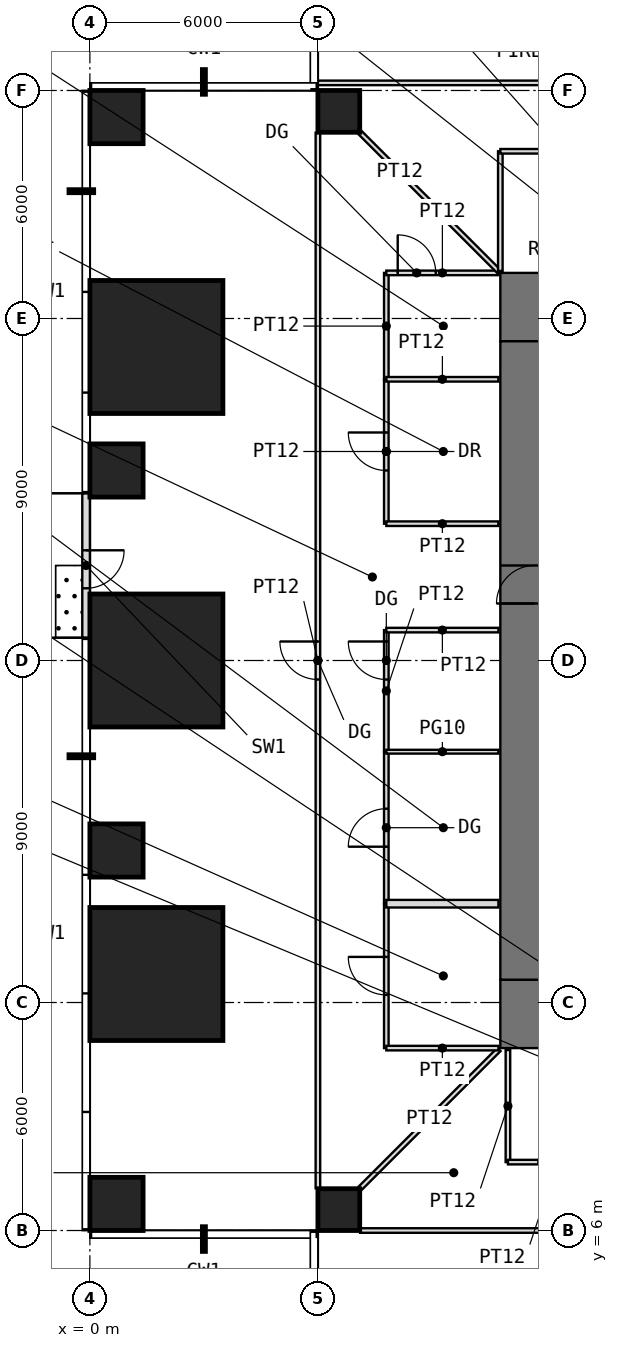
"""IFC4 building model, lengths in metres.
Left out: names, types, materials, properties, quantities, classifications, styles, units other than length and angle.
Written with IfcOpenShell. Run it as: python <this file> out.ifc"""

import sys

from ifc_helpers import new_model, si_unit, direction, frame, frame_2d, origin, origin_2d, place, context, subcontext, project, spatial, rectangle, extrude, element, fill, save


model = new_model("IFC4")
c1 = context("Model", 3, precision=1e-05, world=origin(), true_north=direction((0.0, 1.0)))
c2 = subcontext(c1, "Body", "Model", "MODEL_VIEW")
j1 = project(units=[si_unit("LENGTHUNIT", "METRE"), si_unit("PLANEANGLEUNIT", "RADIAN")], contexts=[c1])
p1 = place(None, origin())
s1 = spatial("IfcSite", under=j1, at=p1, CompositionType="ELEMENT")
p2 = place(p1, origin())
s2 = spatial("IfcBuilding", under=s1, at=p2, CompositionType="ELEMENT")
p3 = place(p2, frame((0.0, 0.0, 66.5)))
s3 = spatial("IfcBuildingStorey", under=s2, at=p3, CompositionType="ELEMENT", Elevation=66.5)
p4 = place(p3, frame((0.7, 6.7, 0.0), z_axis=(0.0, 0.0, 1.0), x_axis=(1.0, 0.0, 0.0)))
e1 = element("IfcColumn", 1, at=p4, inside=s3, PredefinedType="COLUMN", context=c2, shape_type="SweptSolid", body=[
    extrude(rectangle(XDim=1.4, YDim=1.4, at=origin_2d()), origin(), (0.0, 0.0, 1.0), 4.0),
])
p5 = place(p3, frame((6.55, 6.55, 0.0), z_axis=(0.0, 0.0, 1.0), x_axis=(1.0, 0.0, 0.0)))
e2 = element("IfcColumn", 2, at=p5, inside=s3, PredefinedType="COLUMN", context=c2, shape_type="SweptSolid", body=[
    extrude(rectangle(XDim=1.1, YDim=1.1, at=origin_2d()), origin(), (0.0, 0.0, 1.0), 4.0),
])
p6 = place(p3, frame((1.75, 12.75, 0.0), z_axis=(0.0, 0.0, 1.0), x_axis=(1.0, 0.0, 0.0)))
e3 = element("IfcColumn", 3, at=p6, inside=s3, PredefinedType="COLUMN", context=c2, shape_type="SweptSolid", body=[
    extrude(rectangle(XDim=3.5, YDim=3.5, at=origin_2d()), origin(), (0.0, 0.0, 1.0), 4.0),
])
p7 = place(p3, frame((0.7, 16.0, 0.0), z_axis=(0.0, 0.0, 1.0), x_axis=(1.0, 0.0, 0.0)))
e4 = element("IfcColumn", 4, at=p7, inside=s3, PredefinedType="COLUMN", context=c2, shape_type="SweptSolid", body=[
    extrude(rectangle(XDim=1.4, YDim=1.4, at=origin_2d()), origin(), (0.0, 0.0, 1.0), 4.0),
])
p8 = place(p3, frame((1.75, 21.0, 0.0), z_axis=(0.0, 0.0, 1.0), x_axis=(1.0, 0.0, 0.0)))
e5 = element("IfcColumn", 5, at=p8, inside=s3, PredefinedType="COLUMN", context=c2, shape_type="SweptSolid", body=[
    extrude(rectangle(XDim=3.5, YDim=3.5, at=origin_2d()), origin(), (0.0, 0.0, 1.0), 4.0),
])
p9 = place(p3, frame((0.7, 26.0, 0.0), z_axis=(0.0, 0.0, 1.0), x_axis=(1.0, 0.0, 0.0)))
e6 = element("IfcColumn", 6, at=p9, inside=s3, PredefinedType="COLUMN", context=c2, shape_type="SweptSolid", body=[
    extrude(rectangle(XDim=1.4, YDim=1.4, at=origin_2d()), origin(), (0.0, 0.0, 1.0), 4.0),
])
p10 = place(p3, frame((1.75, 29.25, 0.0), z_axis=(0.0, 0.0, 1.0), x_axis=(1.0, 0.0, 0.0)))
e7 = element("IfcColumn", 7, at=p10, inside=s3, PredefinedType="COLUMN", context=c2, shape_type="SweptSolid", body=[
    extrude(rectangle(XDim=3.5, YDim=3.5, at=origin_2d()), origin(), (0.0, 0.0, 1.0), 4.0),
])
p11 = place(p3, frame((0.7, 35.3, 0.0), z_axis=(0.0, 0.0, 1.0), x_axis=(1.0, 0.0, 0.0)))
e8 = element("IfcColumn", 8, at=p11, inside=s3, PredefinedType="COLUMN", context=c2, shape_type="SweptSolid", body=[
    extrude(rectangle(XDim=1.4, YDim=1.4, at=origin_2d()), origin(), (0.0, 0.0, 1.0), 4.0),
])
p12 = place(p3, frame((6.55, 35.45, 0.0), z_axis=(0.0, 0.0, 1.0), x_axis=(1.0, 0.0, 0.0)))
e9 = element("IfcColumn", 9, at=p12, inside=s3, PredefinedType="COLUMN", context=c2, shape_type="SweptSolid", body=[
    extrude(rectangle(XDim=1.1, YDim=1.1, at=origin_2d()), origin(), (0.0, 0.0, 1.0), 4.0),
])
p13 = place(p3, frame((-0.1, 25.4, 0.0), z_axis=(0.0, 0.0, 1.0), x_axis=(0.0, -1.0, 0.0)))
e10 = element("IfcWall", 10, at=p13, inside=s3, PredefinedType="USERDEFINED", context=c2, shape_type="SweptSolid", body=[
    extrude(rectangle(XDim=3.8, YDim=0.2, at=frame_2d((1.9, 0.0))), origin(), (0.0, 0.0, 1.0), 3.75),
])
p14 = place(p13, frame((1.5, 0.0, 0.0)))
e11 = element("IfcOpeningElement", 11, at=p14, cuts=e10, PredefinedType="OPENING", context=c2, shape_type="SweptSolid", body=[
    extrude(rectangle(XDim=1.0, YDim=2.4, at=frame_2d((0.5, 1.2))), frame((0.0, 0.11, 0.0), z_axis=(0.0, -1.0, 0.0), x_axis=(1.0, 0.0, 0.0)), (0.0, 0.0, 1.0), 0.22),
])
p15 = place(p3, frame((10.8, 11.7, -0.05), z_axis=(0.0, 0.0, 1.0), x_axis=(1.0, 0.0, 0.0)))
e12 = element("IfcWall", 12, at=p15, inside=s3, PredefinedType="SHEAR", context=c2, shape_type="SweptSolid", body=[
    extrude(rectangle(XDim=20.4, YDim=1.8, at=frame_2d((10.2, 0.0))), origin(), (0.0, 0.0, 1.0), 4.0),
])
p16 = place(p15, frame((9.2, 0.0, 0.05)))
e13 = element("IfcOpeningElement", 13, at=p16, cuts=e12, PredefinedType="OPENING", context=c2, shape_type="SweptSolid", body=[
    extrude(rectangle(XDim=2.0, YDim=2.2, at=frame_2d((1.0, 1.1))), frame((0.0, 0.91, 0.0), z_axis=(0.0, -1.0, 0.0), x_axis=(1.0, 0.0, 0.0)), (0.0, 0.0, 1.0), 1.82),
])
p17 = place(p3, frame((10.8, 30.3, -0.05), z_axis=(0.0, 0.0, 1.0), x_axis=(1.0, 0.0, 0.0)))
e14 = element("IfcWall", 14, at=p17, inside=s3, PredefinedType="SHEAR", context=c2, shape_type="SweptSolid", body=[
    extrude(rectangle(XDim=20.4, YDim=1.8, at=frame_2d((10.2, 0.0))), origin(), (0.0, 0.0, 1.0), 4.0),
])
p18 = place(p17, frame((9.2, 0.0, 0.05)))
e15 = element("IfcOpeningElement", 15, at=p18, cuts=e14, PredefinedType="OPENING", context=c2, shape_type="SweptSolid", body=[
    extrude(rectangle(XDim=2.0, YDim=2.2, at=frame_2d((1.0, 1.1))), frame((0.0, 0.91, 0.0), z_axis=(0.0, -1.0, 0.0), x_axis=(1.0, 0.0, 0.0)), (0.0, 0.0, 1.0), 1.82),
])
p19 = place(p3, frame((11.7, 12.6, -0.05), z_axis=(0.0, 0.0, 1.0), x_axis=(0.0, 1.0, 0.0)))
e16 = element("IfcWall", 16, at=p19, inside=s3, PredefinedType="SHEAR", context=c2, shape_type="SweptSolid", body=[
    extrude(rectangle(XDim=16.8, YDim=1.8, at=frame_2d((8.4, 0.0))), origin(), (0.0, 0.0, 1.0), 4.0),
])
p20 = place(p19, frame((9.9, 0.0, 0.05)))
e17 = element("IfcOpeningElement", 17, at=p20, cuts=e16, PredefinedType="OPENING", context=c2, shape_type="SweptSolid", body=[
    extrude(rectangle(XDim=1.0, YDim=2.2, at=frame_2d((0.5, 1.1))), frame((0.0, 0.91, 0.0), z_axis=(0.0, -1.0, 0.0), x_axis=(1.0, 0.0, 0.0)), (0.0, 0.0, 1.0), 1.82),
])
p21 = place(p3, frame((6.0, 7.11, 0.0), z_axis=(0.0, 0.0, 1.0), x_axis=(0.0, 1.0, 0.0)))
e18 = element("IfcWall", 18, at=p21, inside=s3, PredefinedType="PARTITIONING", context=c2, shape_type="SweptSolid", body=[
    extrude(rectangle(XDim=27.78, YDim=0.12, at=frame_2d((13.89, 0.0))), origin(), (0.0, 0.0, 1.0), 3.75),
])
p22 = place(p21, frame((13.39, 0.0, 0.0)))
e19 = element("IfcOpeningElement", 19, at=p22, cuts=e18, PredefinedType="OPENING", context=c2, shape_type="SweptSolid", body=[
    extrude(rectangle(XDim=1.0, YDim=2.4, at=frame_2d((0.5, 1.2))), frame((0.0, 0.07, 0.0), z_axis=(0.0, -1.0, 0.0), x_axis=(1.0, 0.0, 0.0)), (0.0, 0.0, 1.0), 0.14),
])
p23 = place(p3, frame((6.0, 36.2, 0.0), z_axis=(0.0, 0.0, 1.0), x_axis=(1.0, 0.0, 0.0)))
e20 = element("IfcWall", 20, at=p23, inside=s3, PredefinedType="PARTITIONING", context=c2, shape_type="SweptSolid", body=[
    extrude(rectangle(XDim=30.0, YDim=0.12, at=frame_2d((15.0, 0.0))), origin(), (0.0, 0.0, 1.0), 3.75),
])
p24 = place(p23, frame((14.5, 0.0, 0.0)))
e21 = element("IfcOpeningElement", 21, at=p24, cuts=e20, PredefinedType="OPENING", context=c2, shape_type="SweptSolid", body=[
    extrude(rectangle(XDim=1.0, YDim=2.4, at=frame_2d((0.5, 1.2))), frame((0.0, 0.07, 0.0), z_axis=(0.0, -1.0, 0.0), x_axis=(1.0, 0.0, 0.0)), (0.0, 0.0, 1.0), 0.14),
])
p25 = place(p3, frame((7.11, 6.0, 0.0), z_axis=(0.0, 0.0, 1.0), x_axis=(1.0, 0.0, 0.0)))
e22 = element("IfcWall", 22, at=p25, inside=s3, PredefinedType="PARTITIONING", context=c2, shape_type="SweptSolid", body=[
    extrude(rectangle(XDim=27.78, YDim=0.12, at=frame_2d((13.89, 0.0))), origin(), (0.0, 0.0, 1.0), 3.75),
])
p26 = place(p25, frame((13.39, 0.0, 0.0)))
e23 = element("IfcOpeningElement", 23, at=p26, cuts=e22, PredefinedType="OPENING", context=c2, shape_type="SweptSolid", body=[
    extrude(rectangle(XDim=1.0, YDim=2.4, at=frame_2d((0.5, 1.2))), frame((0.0, 0.07, 0.0), z_axis=(0.0, -1.0, 0.0), x_axis=(1.0, 0.0, 0.0)), (0.0, 0.0, 1.0), 0.14),
])
p27 = place(p3, frame((7.11, 7.11, 0.0), z_axis=(0.0, 0.0, 1.0), x_axis=(0.707106781187, 0.707106781187, 0.0)))
e24 = element("IfcWall", 24, at=p27, inside=s3, PredefinedType="PARTITIONING", context=c2, shape_type="SweptSolid", body=[
    extrude(rectangle(XDim=5.168, YDim=0.12, at=frame_2d((2.584, 0.0))), origin(), (0.0, 0.0, 1.0), 3.75),
])
p28 = place(p3, frame((7.11, 34.89, 0.0), z_axis=(0.0, 0.0, 1.0), x_axis=(0.707106781187, -0.707106781187, 0.0)))
e25 = element("IfcWall", 25, at=p28, inside=s3, PredefinedType="PARTITIONING", context=c2, shape_type="SweptSolid", body=[
    extrude(rectangle(XDim=2.95, YDim=0.12, at=frame_2d((1.475, 0.0))), origin(), (0.0, 0.0, 1.0), 3.75),
])
p29 = place(p3, frame((7.8, 10.8, 0.0), z_axis=(0.0, 0.0, 1.0), x_axis=(0.0, 1.0, 0.0)))
e26 = element("IfcWall", 26, at=p29, inside=s3, PredefinedType="PARTITIONING", context=c2, shape_type="SweptSolid", body=[
    extrude(rectangle(XDim=3.8, YDim=0.12, at=frame_2d((1.9, 0.0))), origin(), (0.0, 0.0, 1.0), 3.75),
])
p30 = place(p29, frame((1.4, 0.0, 0.0)))
e27 = element("IfcOpeningElement", 27, at=p30, cuts=e26, PredefinedType="OPENING", context=c2, shape_type="SweptSolid", body=[
    extrude(rectangle(XDim=1.0, YDim=2.4, at=frame_2d((0.5, 1.2))), frame((0.0, 0.07, 0.0), z_axis=(0.0, -1.0, 0.0), x_axis=(1.0, 0.0, 0.0)), (0.0, 0.0, 1.0), 0.14),
])
p31 = place(p3, frame((7.8, 10.8, 0.0), z_axis=(0.0, 0.0, 1.0), x_axis=(1.0, 0.0, 0.0)))
e28 = element("IfcWall", 28, at=p31, inside=s3, PredefinedType="PARTITIONING", context=c2, shape_type="SweptSolid", body=[
    extrude(rectangle(XDim=2.95, YDim=0.12, at=frame_2d((1.475, 0.0))), origin(), (0.0, 0.0, 1.0), 3.75),
])
p32 = place(p3, frame((7.8, 14.6, 0.0), z_axis=(0.0, 0.0, 1.0), x_axis=(0.0, 1.0, 0.0)))
e29 = element("IfcWall", 29, at=p32, inside=s3, PredefinedType="PARTITIONING", context=c2, shape_type="SweptSolid", body=[
    extrude(rectangle(XDim=4.0, YDim=0.12, at=frame_2d((2.0, 0.0))), origin(), (0.0, 0.0, 1.0), 3.75),
])
p33 = place(p32, frame((1.5, 0.0, 0.0)))
e30 = element("IfcOpeningElement", 30, at=p33, cuts=e29, PredefinedType="OPENING", context=c2, shape_type="SweptSolid", body=[
    extrude(rectangle(XDim=1.0, YDim=2.4, at=frame_2d((0.5, 1.2))), frame((0.0, 0.07, 0.0), z_axis=(0.0, -1.0, 0.0), x_axis=(1.0, 0.0, 0.0)), (0.0, 0.0, 1.0), 0.14),
])
p34 = place(p3, frame((7.8, 14.6, 0.0), z_axis=(0.0, 0.0, 1.0), x_axis=(1.0, 0.0, 0.0)))
e31 = element("IfcWall", 31, at=p34, inside=s3, PredefinedType="PARTITIONING", context=c2, shape_type="SweptSolid", body=[
    extrude(rectangle(XDim=2.95, YDim=0.2, at=frame_2d((1.475, 0.0))), origin(), (0.0, 0.0, 1.0), 3.75),
])
p35 = place(p3, frame((7.8, 18.6, 0.0), z_axis=(0.0, 0.0, 1.0), x_axis=(0.0, 1.0, 0.0)))
e32 = element("IfcWall", 32, at=p35, inside=s3, PredefinedType="PARTITIONING", context=c2, shape_type="SweptSolid", body=[
    extrude(rectangle(XDim=3.2, YDim=0.12, at=frame_2d((1.6, 0.0))), origin(), (0.0, 0.0, 1.0), 3.75),
])
p36 = place(p35, frame((1.9, 0.0, 0.0)))
e33 = element("IfcOpeningElement", 33, at=p36, cuts=e32, PredefinedType="OPENING", context=c2, shape_type="SweptSolid", body=[
    extrude(rectangle(XDim=1.0, YDim=2.4, at=frame_2d((0.5, 1.2))), frame((0.0, 0.07, 0.0), z_axis=(0.0, -1.0, 0.0), x_axis=(1.0, 0.0, 0.0)), (0.0, 0.0, 1.0), 0.14),
])
p37 = place(p3, frame((7.8, 18.6, 0.0), z_axis=(0.0, 0.0, 1.0), x_axis=(1.0, 0.0, 0.0)))
e34 = element("IfcWall", 34, at=p37, inside=s3, PredefinedType="PARTITIONING", context=c2, shape_type="SweptSolid", body=[
    extrude(rectangle(XDim=2.95, YDim=0.1, at=frame_2d((1.475, 0.0))), origin(), (0.0, 0.0, 1.0), 3.75),
])
p38 = place(p3, frame((7.8, 21.8, 0.0), z_axis=(0.0, 0.0, 1.0), x_axis=(1.0, 0.0, 0.0)))
e35 = element("IfcWall", 35, at=p38, inside=s3, PredefinedType="PARTITIONING", context=c2, shape_type="SweptSolid", body=[
    extrude(rectangle(XDim=2.95, YDim=0.12, at=frame_2d((1.475, 0.0))), origin(), (0.0, 0.0, 1.0), 3.75),
])
p39 = place(p3, frame((7.8, 24.6, 0.0), z_axis=(0.0, 0.0, 1.0), x_axis=(0.0, 1.0, 0.0)))
e36 = element("IfcWall", 36, at=p39, inside=s3, PredefinedType="PARTITIONING", context=c2, shape_type="SweptSolid", body=[
    extrude(rectangle(XDim=3.8, YDim=0.12, at=frame_2d((1.9, 0.0))), origin(), (0.0, 0.0, 1.0), 3.75),
])
p40 = place(p39, frame((1.4, 0.0, 0.0)))
e37 = element("IfcOpeningElement", 37, at=p40, cuts=e36, PredefinedType="OPENING", context=c2, shape_type="SweptSolid", body=[
    extrude(rectangle(XDim=1.0, YDim=2.2, at=frame_2d((0.5, 1.1))), frame((0.0, 0.07, 0.0), z_axis=(0.0, -1.0, 0.0), x_axis=(1.0, 0.0, 0.0)), (0.0, 0.0, 1.0), 0.14),
])
p41 = place(p3, frame((7.8, 24.6, 0.0), z_axis=(0.0, 0.0, 1.0), x_axis=(1.0, 0.0, 0.0)))
e38 = element("IfcWall", 38, at=p41, inside=s3, PredefinedType="PARTITIONING", context=c2, shape_type="SweptSolid", body=[
    extrude(rectangle(XDim=2.95, YDim=0.12, at=frame_2d((1.475, 0.0))), origin(), (0.0, 0.0, 1.0), 3.75),
])
p42 = place(p3, frame((7.8, 28.4, 0.0), z_axis=(0.0, 0.0, 1.0), x_axis=(0.0, 1.0, 0.0)))
e39 = element("IfcWall", 39, at=p42, inside=s3, PredefinedType="PARTITIONING", context=c2, shape_type="SweptSolid", body=[
    extrude(rectangle(XDim=2.8, YDim=0.12, at=frame_2d((1.4, 0.0))), origin(), (0.0, 0.0, 1.0), 3.75),
])
p43 = place(p3, frame((7.8, 28.4, 0.0), z_axis=(0.0, 0.0, 1.0), x_axis=(1.0, 0.0, 0.0)))
e40 = element("IfcWall", 40, at=p43, inside=s3, PredefinedType="PARTITIONING", context=c2, shape_type="SweptSolid", body=[
    extrude(rectangle(XDim=2.95, YDim=0.12, at=frame_2d((1.475, 0.0))), origin(), (0.0, 0.0, 1.0), 3.75),
])
p44 = place(p3, frame((7.8, 31.2, 0.0), z_axis=(0.0, 0.0, 1.0), x_axis=(1.0, 0.0, 0.0)))
e41 = element("IfcWall", 41, at=p44, inside=s3, PredefinedType="PARTITIONING", context=c2, shape_type="SweptSolid", body=[
    extrude(rectangle(XDim=2.95, YDim=0.12, at=frame_2d((1.475, 0.0))), origin(), (0.0, 0.0, 1.0), 3.75),
])
p45 = place(p44, frame((0.3, 0.0, 0.0)))
e42 = element("IfcOpeningElement", 42, at=p45, cuts=e41, PredefinedType="OPENING", context=c2, shape_type="SweptSolid", body=[
    extrude(rectangle(XDim=1.0, YDim=2.4, at=frame_2d((0.5, 1.2))), frame((0.0, 0.07, 0.0), z_axis=(0.0, -1.0, 0.0), x_axis=(1.0, 0.0, 0.0)), (0.0, 0.0, 1.0), 0.14),
])
p46 = place(p3, frame((9.196, 32.804, 0.0), z_axis=(0.0, 0.0, 1.0), x_axis=(0.707106781187, -0.707106781187, 0.0)))
e43 = element("IfcWall", 43, at=p46, inside=s3, PredefinedType="PARTITIONING", context=c2, shape_type="SweptSolid", body=[
    extrude(rectangle(XDim=2.218, YDim=0.12, at=frame_2d((1.109, 0.0))), origin(), (0.0, 0.0, 1.0), 3.75),
])
p47 = place(p3, frame((10.8, 31.25, 0.0), z_axis=(0.0, 0.0, 1.0), x_axis=(0.0, 1.0, 0.0)))
e44 = element("IfcWall", 44, at=p47, inside=s3, PredefinedType="PARTITIONING", context=c2, shape_type="SweptSolid", body=[
    extrude(rectangle(XDim=3.15, YDim=0.12, at=frame_2d((1.575, 0.0))), origin(), (0.0, 0.0, 1.0), 3.75),
])
p48 = place(p3, frame((10.8, 34.4, 0.0), z_axis=(0.0, 0.0, 1.0), x_axis=(1.0, 0.0, 0.0)))
e45 = element("IfcWall", 45, at=p48, inside=s3, PredefinedType="PARTITIONING", context=c2, shape_type="SweptSolid", body=[
    extrude(rectangle(XDim=3.2, YDim=0.12, at=frame_2d((1.6, 0.0))), origin(), (0.0, 0.0, 1.0), 3.75),
])
p49 = place(p48, frame((1.1, 0.0, 0.0)))
e46 = element("IfcOpeningElement", 46, at=p49, cuts=e45, PredefinedType="OPENING", context=c2, shape_type="SweptSolid", body=[
    extrude(rectangle(XDim=1.0, YDim=2.2, at=frame_2d((0.5, 1.1))), frame((0.0, 0.07, 0.0), z_axis=(0.0, -1.0, 0.0), x_axis=(1.0, 0.0, 0.0)), (0.0, 0.0, 1.0), 0.14),
])
p50 = place(p3, frame((11.0, 7.8, 0.0), z_axis=(0.0, 0.0, 1.0), x_axis=(0.0, 1.0, 0.0)))
e47 = element("IfcWall", 47, at=p50, inside=s3, PredefinedType="PARTITIONING", context=c2, shape_type="SweptSolid", body=[
    extrude(rectangle(XDim=2.95, YDim=0.12, at=frame_2d((1.475, 0.0))), origin(), (0.0, 0.0, 1.0), 3.75),
])
p51 = place(p3, frame((11.0, 7.8, 0.0), z_axis=(0.0, 0.0, 1.0), x_axis=(1.0, 0.0, 0.0)))
e48 = element("IfcWall", 48, at=p51, inside=s3, PredefinedType="PARTITIONING", context=c2, shape_type="SweptSolid", body=[
    extrude(rectangle(XDim=2.6, YDim=0.12, at=frame_2d((1.3, 0.0))), origin(), (0.0, 0.0, 1.0), 3.75),
])
p52 = place(p51, frame((0.8, 0.0, 0.0)))
e49 = element("IfcOpeningElement", 49, at=p52, cuts=e48, PredefinedType="OPENING", context=c2, shape_type="SweptSolid", body=[
    extrude(rectangle(XDim=1.0, YDim=2.4, at=frame_2d((0.5, 1.2))), frame((0.0, 0.07, 0.0), z_axis=(0.0, -1.0, 0.0), x_axis=(1.0, 0.0, 0.0)), (0.0, 0.0, 1.0), 0.14),
])
p53 = place(p14, origin())
e50 = element("IfcDoor", 50, at=p53, inside=s3, OperationType="SINGLE_SWING_LEFT", PredefinedType="DOOR", context=c2, shape_type="SweptSolid", body=[
    extrude(rectangle(XDim=1.0, YDim=2.4, at=frame_2d((0.5, 1.2))), frame((0.0, 0.025, 0.0), z_axis=(0.0, -1.0, 0.0), x_axis=(1.0, 0.0, 0.0)), (0.0, 0.0, 1.0), 0.05),
])
fill(e11, e50)
p54 = place(p20, origin())
e51 = element("IfcDoor", 51, at=p54, inside=s3, OperationType="SINGLE_SWING_LEFT", PredefinedType="DOOR", context=c2, shape_type="SweptSolid", body=[
    extrude(rectangle(XDim=1.0, YDim=2.2, at=frame_2d((0.5, 1.1))), frame((0.0, 0.025, 0.0), z_axis=(0.0, -1.0, 0.0), x_axis=(1.0, 0.0, 0.0)), (0.0, 0.0, 1.0), 0.05),
])
fill(e17, e51)
p55 = place(p30, origin())
e52 = element("IfcDoor", 52, at=p55, inside=s3, OperationType="SINGLE_SWING_RIGHT", PredefinedType="DOOR", context=c2, shape_type="SweptSolid", body=[
    extrude(rectangle(XDim=1.0, YDim=2.4, at=frame_2d((0.5, 1.2))), frame((0.0, 0.025, 0.0), z_axis=(0.0, -1.0, 0.0), x_axis=(1.0, 0.0, 0.0)), (0.0, 0.0, 1.0), 0.05),
])
fill(e27, e52)
p56 = place(p33, origin())
e53 = element("IfcDoor", 53, at=p56, inside=s3, OperationType="SINGLE_SWING_LEFT", PredefinedType="DOOR", context=c2, shape_type="SweptSolid", body=[
    extrude(rectangle(XDim=1.0, YDim=2.4, at=frame_2d((0.5, 1.2))), frame((0.0, 0.025, 0.0), z_axis=(0.0, -1.0, 0.0), x_axis=(1.0, 0.0, 0.0)), (0.0, 0.0, 1.0), 0.05),
])
fill(e30, e53)
p57 = place(p40, origin())
e54 = element("IfcDoor", 54, at=p57, inside=s3, OperationType="SINGLE_SWING_RIGHT", PredefinedType="DOOR", context=c2, shape_type="SweptSolid", body=[
    extrude(rectangle(XDim=1.0, YDim=2.2, at=frame_2d((0.5, 1.1))), frame((0.0, 0.025, 0.0), z_axis=(0.0, -1.0, 0.0), x_axis=(1.0, 0.0, 0.0)), (0.0, 0.0, 1.0), 0.05),
])
fill(e37, e54)
p58 = place(p22, origin())
e55 = element("IfcDoor", 55, at=p58, inside=s3, OperationType="SINGLE_SWING_RIGHT", PredefinedType="DOOR", context=c2, shape_type="SweptSolid", body=[
    extrude(rectangle(XDim=1.0, YDim=2.4, at=frame_2d((0.5, 1.2))), frame((0.0, 0.025, 0.0), z_axis=(0.0, -1.0, 0.0), x_axis=(1.0, 0.0, 0.0)), (0.0, 0.0, 1.0), 0.05),
])
fill(e19, e55)
p59 = place(p45, origin())
e56 = element("IfcDoor", 56, at=p59, inside=s3, OperationType="SINGLE_SWING_LEFT", PredefinedType="DOOR", context=c2, shape_type="SweptSolid", body=[
    extrude(rectangle(XDim=1.0, YDim=2.4, at=frame_2d((0.5, 1.2))), frame((0.0, 0.025, 0.0), z_axis=(0.0, -1.0, 0.0), x_axis=(1.0, 0.0, 0.0)), (0.0, 0.0, 1.0), 0.05),
])
fill(e42, e56)
p60 = place(p36, origin())
e57 = element("IfcDoor", 57, at=p60, inside=s3, OperationType="SINGLE_SWING_RIGHT", PredefinedType="DOOR", context=c2, shape_type="SweptSolid", body=[
    extrude(rectangle(XDim=1.0, YDim=2.4, at=frame_2d((0.5, 1.2))), frame((0.0, 0.025, 0.0), z_axis=(0.0, -1.0, 0.0), x_axis=(1.0, 0.0, 0.0)), (0.0, 0.0, 1.0), 0.05),
])
fill(e33, e57)
save(model, sys.argv[1])
